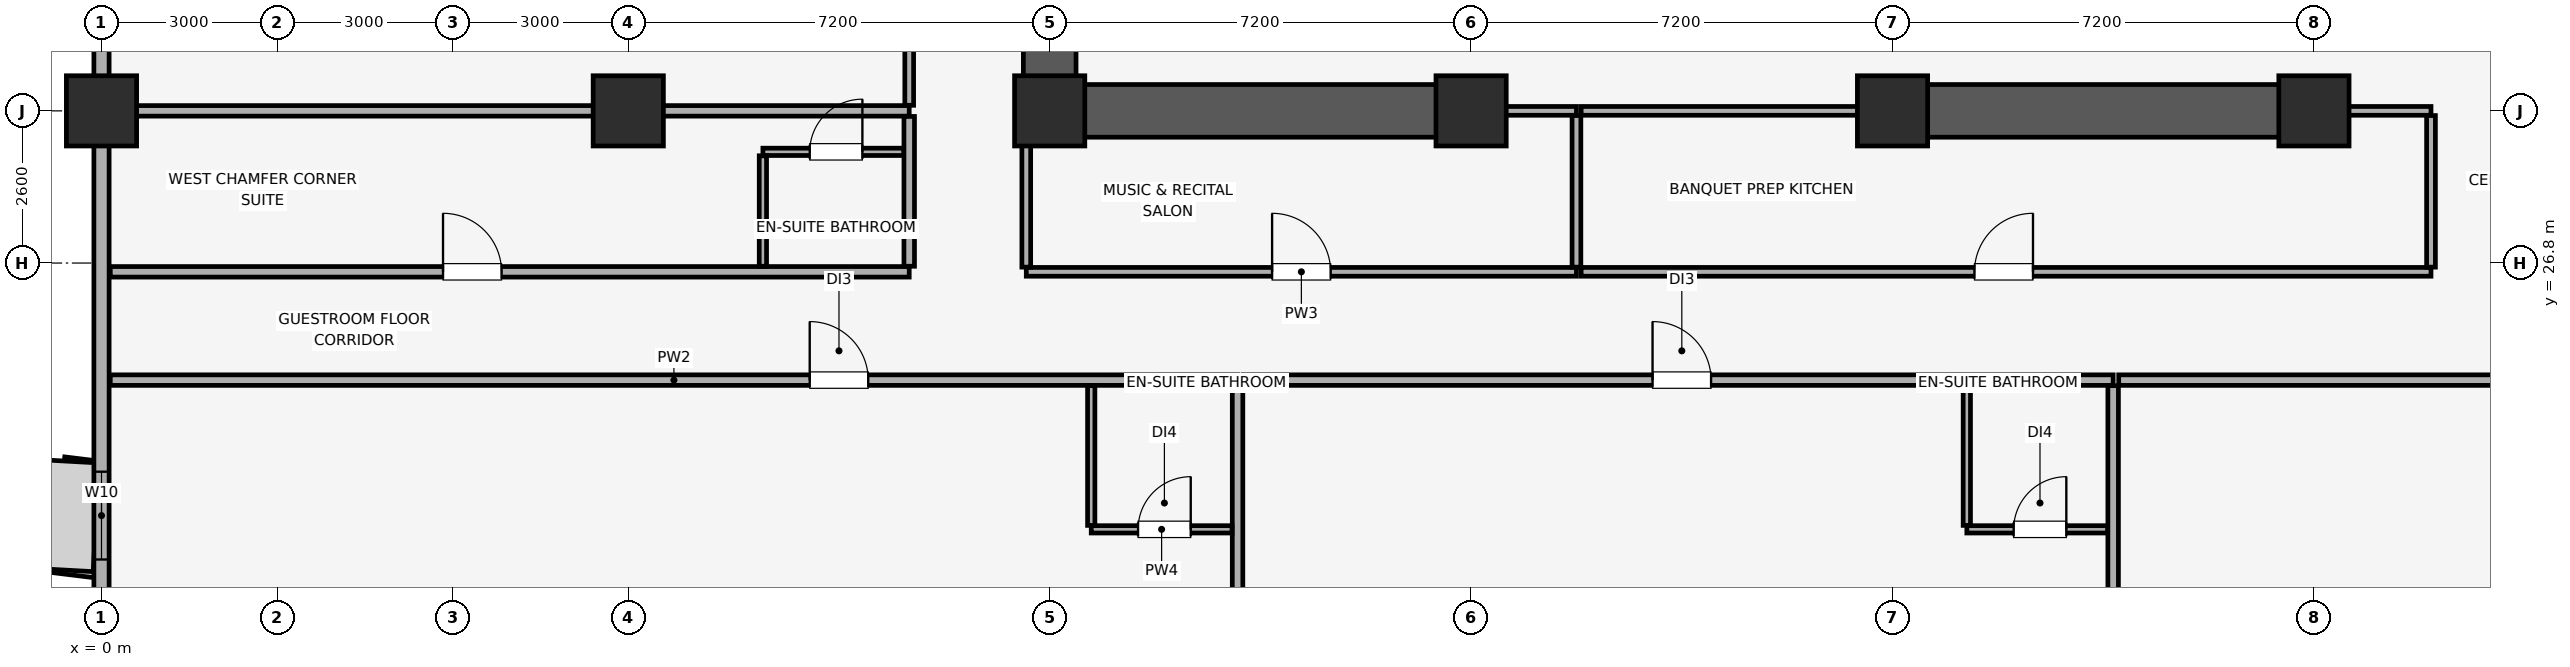
"""IFC4 building model, lengths in metres.
Left out: names, types, materials, properties, quantities, classifications, styles, units other than length and angle.
Written with IfcOpenShell. Run it as: python <this file> out.ifc"""

import sys

from ifc_helpers import new_model, si_unit, direction, frame, frame_2d, origin, origin_2d, place, context, subcontext, project, spatial, rectangle, extrude, element, fill, save


model = new_model("IFC4")
c1 = context("Model", 3, precision=1e-05, world=origin(), true_north=direction((0.0, 1.0)))
c2 = subcontext(c1, "Body", "Model", "MODEL_VIEW")
j1 = project(units=[si_unit("LENGTHUNIT", "METRE"), si_unit("PLANEANGLEUNIT", "RADIAN")], contexts=[c1])
p1 = place(None, origin())
s1 = spatial("IfcSite", under=j1, at=p1, CompositionType="ELEMENT")
p2 = place(p1, origin())
s2 = spatial("IfcBuilding", under=s1, at=p2, CompositionType="ELEMENT")
p3 = place(p2, frame((0.0, 0.0, 126.8)))
s3 = spatial("IfcBuildingStorey", under=s2, at=p3, CompositionType="ELEMENT", Elevation=126.8)
for number, where, z_axis, x_axis in (
    (1, (0.0, 29.4, 0.0), (0.0, 0.0, 1.0), (1.0, 0.0, 0.0)),
    (2, (9.0, 29.4, 0.0), (0.0, 0.0, 1.0), (1.0, 0.0, 0.0)),
    (3, (16.2, 29.4, 0.0), (0.0, 0.0, 1.0), (1.0, 0.0, 0.0)),
    (4, (23.4, 29.4, 0.0), (0.0, 0.0, 1.0), (1.0, 0.0, 0.0)),
    (5, (30.6, 29.4, 0.0), (0.0, 0.0, 1.0), (1.0, 0.0, 0.0)),
    (6, (37.8, 29.4, 0.0), (0.0, 0.0, 1.0), (1.0, 0.0, 0.0)),
):
    element("IfcColumn", number, at=place(p3, frame(where, z_axis=z_axis, x_axis=x_axis)), inside=s3, PredefinedType="COLUMN", context=c2, shape_type="SweptSolid", body=[
        extrude(rectangle(XDim=1.2, YDim=1.2, at=origin_2d()), origin(), (0.0, 0.0, 1.0), 3.51),
    ])
p4 = place(p3, frame((0.0, 44.8, 0.0), z_axis=(0.0, 0.0, 1.0), x_axis=(0.0, -1.0, 0.0)))
e7 = element("IfcWall", 7, at=p4, inside=s3, PredefinedType="SOLIDWALL", context=c2, shape_type="SweptSolid", body=[
    extrude(rectangle(XDim=40.6, YDim=0.26, at=frame_2d((20.3, 0.0))), origin(), (0.0, 0.0, 1.0), 2.56),
])
p5 = place(p4, frame((33.05, 0.0, 0.85)))
e8 = element("IfcOpeningElement", 8, at=p5, cuts=e7, PredefinedType="OPENING", context=c2, shape_type="SweptSolid", body=[
    extrude(rectangle(XDim=1.5, YDim=1.4, at=frame_2d((0.75, 0.7))), frame((0.0, 0.14, 0.0), z_axis=(0.0, -1.0, 0.0), x_axis=(1.0, 0.0, 0.0)), (0.0, 0.0, 1.0), 0.28),
])
p6 = place(p4, frame((26.335, 0.0, 0.85)))
e9 = element("IfcOpeningElement", 9, at=p6, cuts=e7, PredefinedType="OPENING", context=c2, shape_type="SweptSolid", body=[
    extrude(rectangle(XDim=1.5, YDim=1.4, at=frame_2d((0.75, 0.7))), frame((0.0, 0.14, 0.0), z_axis=(0.0, -1.0, 0.0), x_axis=(1.0, 0.0, 0.0)), (0.0, 0.0, 1.0), 0.28),
])
p7 = place(p4, frame((21.565, 0.0, 0.85)))
e10 = element("IfcOpeningElement", 10, at=p7, cuts=e7, PredefinedType="OPENING", context=c2, shape_type="SweptSolid", body=[
    extrude(rectangle(XDim=1.5, YDim=1.4, at=frame_2d((0.75, 0.7))), frame((0.0, 0.14, 0.0), z_axis=(0.0, -1.0, 0.0), x_axis=(1.0, 0.0, 0.0)), (0.0, 0.0, 1.0), 0.28),
])
p8 = place(p4, frame((11.935, 0.0, 0.85)))
e11 = element("IfcOpeningElement", 11, at=p8, cuts=e7, PredefinedType="OPENING", context=c2, shape_type="SweptSolid", body=[
    extrude(rectangle(XDim=1.5, YDim=1.4, at=frame_2d((0.75, 0.7))), frame((0.0, 0.14, 0.0), z_axis=(0.0, -1.0, 0.0), x_axis=(1.0, 0.0, 0.0)), (0.0, 0.0, 1.0), 0.28),
])
p9 = place(p4, frame((7.165, 0.0, 0.85)))
e12 = element("IfcOpeningElement", 12, at=p9, cuts=e7, PredefinedType="OPENING", context=c2, shape_type="SweptSolid", body=[
    extrude(rectangle(XDim=1.5, YDim=1.4, at=frame_2d((0.75, 0.7))), frame((0.0, 0.14, 0.0), z_axis=(0.0, -1.0, 0.0), x_axis=(1.0, 0.0, 0.0)), (0.0, 0.0, 1.0), 0.28),
])
p10 = place(p4, frame((1.735, 0.0, 0.85)))
e13 = element("IfcOpeningElement", 13, at=p10, cuts=e7, PredefinedType="OPENING", context=c2, shape_type="SweptSolid", body=[
    extrude(rectangle(XDim=1.5, YDim=1.4, at=frame_2d((0.75, 0.7))), frame((0.0, 0.14, 0.0), z_axis=(0.0, -1.0, 0.0), x_axis=(1.0, 0.0, 0.0)), (0.0, 0.0, 1.0), 0.28),
])
p11 = place(p3, frame((16.2, 29.4, 0.0), z_axis=(0.0, 0.0, 1.0), x_axis=(0.0, 1.0, 0.0)))
e14 = element("IfcWall", 14, at=p11, inside=s3, PredefinedType="SHEAR", context=c2, shape_type="SweptSolid", body=[
    extrude(rectangle(XDim=19.2, YDim=0.9, at=frame_2d((9.6, 0.0))), origin(), (0.0, 0.0, 1.0), 3.51),
])
p12 = place(p3, frame((16.655, 29.4, 0.0), z_axis=(0.0, 0.0, 1.0), x_axis=(1.0, 0.0, 0.0)))
e15 = element("IfcWall", 15, at=p12, inside=s3, PredefinedType="SHEAR", context=c2, shape_type="SweptSolid", body=[
    extrude(rectangle(XDim=6.945, YDim=0.9, at=frame_2d((3.473, 0.0))), origin(), (0.0, 0.0, 1.0), 3.51),
])
p13 = place(p3, frame((30.4, 29.4, 0.0), z_axis=(0.0, 0.0, 1.0), x_axis=(1.0, 0.0, 0.0)))
e16 = element("IfcWall", 16, at=p13, inside=s3, PredefinedType="SHEAR", context=c2, shape_type="SweptSolid", body=[
    extrude(rectangle(XDim=7.6, YDim=0.9, at=frame_2d((3.8, 0.0))), origin(), (0.0, 0.0, 1.0), 3.51),
])
p14 = place(p3, frame((0.15, 24.8, 0.0), z_axis=(0.0, 0.0, 1.0), x_axis=(1.0, 0.0, 0.0)))
e17 = element("IfcWall", 17, at=p14, inside=s3, PredefinedType="PARTITIONING", context=c2, shape_type="SweptSolid", body=[
    extrude(rectangle(XDim=19.26, YDim=0.18, at=frame_2d((9.63, 0.0))), origin(), (0.0, 0.0, 1.0), 3.51),
])
p15 = place(p14, frame((11.95, 0.0, 0.0)))
e18 = element("IfcOpeningElement", 18, at=p15, cuts=e17, PredefinedType="OPENING", context=c2, shape_type="SweptSolid", body=[
    extrude(rectangle(XDim=1.0, YDim=2.15, at=frame_2d((0.5, 1.075))), frame((0.0, 0.1, 0.0), z_axis=(0.0, -1.0, 0.0), x_axis=(1.0, 0.0, 0.0)), (0.0, 0.0, 1.0), 0.2),
])
p16 = place(p3, frame((19.41, 0.15, 0.0), z_axis=(0.0, 0.0, 1.0), x_axis=(0.0, 1.0, 0.0)))
e19 = element("IfcWall", 19, at=p16, inside=s3, PredefinedType="PARTITIONING", context=c2, shape_type="SweptSolid", body=[
    extrude(rectangle(XDim=24.555, YDim=0.18, at=frame_2d((12.278, 0.0))), origin(), (0.0, 0.0, 1.0), 3.51),
])
p17 = place(p3, frame((16.91, 22.25, 0.0), z_axis=(0.0, 0.0, 1.0), x_axis=(1.0, 0.0, 0.0)))
e20 = element("IfcWall", 20, at=p17, inside=s3, PredefinedType="PARTITIONING", context=c2, shape_type="SweptSolid", body=[
    extrude(rectangle(XDim=2.405, YDim=0.125, at=frame_2d((1.202, 0.0))), origin(), (0.0, 0.0, 1.0), 3.51),
])
p18 = place(p17, frame((0.8, 0.0, 0.0)))
e21 = element("IfcOpeningElement", 21, at=p18, cuts=e20, PredefinedType="OPENING", context=c2, shape_type="SweptSolid", body=[
    extrude(rectangle(XDim=0.9, YDim=2.1, at=frame_2d((0.45, 1.05))), frame((0.0, 0.073, 0.0), z_axis=(0.0, -1.0, 0.0), x_axis=(1.0, 0.0, 0.0)), (0.0, 0.0, 1.0), 0.145),
])
p19 = place(p3, frame((16.91, 22.317, 0.0), z_axis=(0.0, 0.0, 1.0), x_axis=(0.0, 1.0, 0.0)))
e22 = element("IfcWall", 22, at=p19, inside=s3, PredefinedType="PARTITIONING", context=c2, shape_type="SweptSolid", body=[
    extrude(rectangle(XDim=2.388, YDim=0.125, at=frame_2d((1.194, 0.0))), origin(), (0.0, 0.0, 1.0), 3.51),
])
p20 = place(p3, frame((19.505, 24.8, 0.0), z_axis=(0.0, 0.0, 1.0), x_axis=(1.0, 0.0, 0.0)))
e23 = element("IfcWall", 23, at=p20, inside=s3, PredefinedType="PARTITIONING", context=c2, shape_type="SweptSolid", body=[
    extrude(rectangle(XDim=14.865, YDim=0.18, at=frame_2d((7.432, 0.0))), origin(), (0.0, 0.0, 1.0), 3.51),
])
p21 = place(p20, frame((6.995, 0.0, 0.0)))
e24 = element("IfcOpeningElement", 24, at=p21, cuts=e23, PredefinedType="OPENING", context=c2, shape_type="SweptSolid", body=[
    extrude(rectangle(XDim=1.0, YDim=2.15, at=frame_2d((0.5, 1.075))), frame((0.0, 0.1, 0.0), z_axis=(0.0, -1.0, 0.0), x_axis=(1.0, 0.0, 0.0)), (0.0, 0.0, 1.0), 0.2),
])
p22 = place(p3, frame((34.369, 0.15, 0.0), z_axis=(0.0, 0.0, 1.0), x_axis=(0.0, 1.0, 0.0)))
e25 = element("IfcWall", 25, at=p22, inside=s3, PredefinedType="PARTITIONING", context=c2, shape_type="SweptSolid", body=[
    extrude(rectangle(XDim=24.555, YDim=0.18, at=frame_2d((12.278, 0.0))), origin(), (0.0, 0.0, 1.0), 2.91),
])
p23 = place(p3, frame((31.869, 22.25, 0.0), z_axis=(0.0, 0.0, 1.0), x_axis=(1.0, 0.0, 0.0)))
e26 = element("IfcWall", 26, at=p23, inside=s3, PredefinedType="PARTITIONING", context=c2, shape_type="SweptSolid", body=[
    extrude(rectangle(XDim=2.405, YDim=0.125, at=frame_2d((1.203, 0.0))), origin(), (0.0, 0.0, 1.0), 3.51),
])
p24 = place(p23, frame((0.8, 0.0, 0.0)))
e27 = element("IfcOpeningElement", 27, at=p24, cuts=e26, PredefinedType="OPENING", context=c2, shape_type="SweptSolid", body=[
    extrude(rectangle(XDim=0.9, YDim=2.1, at=frame_2d((0.45, 1.05))), frame((0.0, 0.073, 0.0), z_axis=(0.0, -1.0, 0.0), x_axis=(1.0, 0.0, 0.0)), (0.0, 0.0, 1.0), 0.145),
])
p25 = place(p3, frame((31.869, 22.317, 0.0), z_axis=(0.0, 0.0, 1.0), x_axis=(0.0, 1.0, 0.0)))
e28 = element("IfcWall", 28, at=p25, inside=s3, PredefinedType="PARTITIONING", context=c2, shape_type="SweptSolid", body=[
    extrude(rectangle(XDim=2.388, YDim=0.125, at=frame_2d((1.194, 0.0))), origin(), (0.0, 0.0, 1.0), 3.51),
])
p26 = place(p3, frame((34.465, 24.8, 0.0), z_axis=(0.0, 0.0, 1.0), x_axis=(1.0, 0.0, 0.0)))
e29 = element("IfcWall", 29, at=p26, inside=s3, PredefinedType="PARTITIONING", context=c2, shape_type="SweptSolid", body=[
    extrude(rectangle(XDim=15.065, YDim=0.18, at=frame_2d((7.533, 0.0))), origin(), (0.0, 0.0, 1.0), 3.51),
])
p27 = place(p26, frame((7.035, 0.0, 0.0)))
e30 = element("IfcOpeningElement", 30, at=p27, cuts=e29, PredefinedType="OPENING", context=c2, shape_type="SweptSolid", body=[
    extrude(rectangle(XDim=1.0, YDim=2.15, at=frame_2d((0.5, 1.075))), frame((0.0, 0.1, 0.0), z_axis=(0.0, -1.0, 0.0), x_axis=(1.0, 0.0, 0.0)), (0.0, 0.0, 1.0), 0.2),
])
p28 = place(p3, frame((15.8, 26.65, 0.0), z_axis=(0.0, 0.0, 1.0), x_axis=(1.0, 0.0, 0.0)))
e31 = element("IfcWall", 31, at=p28, inside=s3, PredefinedType="PARTITIONING", context=c2, shape_type="SweptSolid", body=[
    extrude(rectangle(XDim=9.4, YDim=0.15, at=frame_2d((4.7, 0.0))), origin(), (0.0, 0.0, 1.0), 3.51),
])
p29 = place(p28, frame((4.2, 0.0, 0.0)))
e32 = element("IfcOpeningElement", 32, at=p29, cuts=e31, PredefinedType="OPENING", context=c2, shape_type="SweptSolid", body=[
    extrude(rectangle(XDim=1.0, YDim=2.15, at=frame_2d((0.5, 1.075))), frame((0.0, 0.085, 0.0), z_axis=(0.0, -1.0, 0.0), x_axis=(1.0, 0.0, 0.0)), (0.0, 0.0, 1.0), 0.17),
])
p30 = place(p3, frame((23.61, 29.4, 0.0), z_axis=(0.0, 0.0, 1.0), x_axis=(1.0, 0.0, 0.0)))
e33 = element("IfcWall", 33, at=p30, inside=s3, PredefinedType="PARTITIONING", context=c2, shape_type="SweptSolid", body=[
    extrude(rectangle(XDim=1.59, YDim=0.15, at=frame_2d((0.795, 0.0))), origin(), (0.0, 0.0, 1.0), 2.41),
])
p31 = place(p3, frame((15.8, 26.73, 0.0), z_axis=(0.0, 0.0, 1.0), x_axis=(0.0, 1.0, 0.0)))
e34 = element("IfcWall", 34, at=p31, inside=s3, PredefinedType="PARTITIONING", context=c2, shape_type="SweptSolid", body=[
    extrude(rectangle(XDim=2.66, YDim=0.15, at=frame_2d((1.33, 0.0))), origin(), (0.0, 0.0, 1.0), 3.51),
])
p32 = place(p3, frame((25.2, 26.73, 0.0), z_axis=(0.0, 0.0, 1.0), x_axis=(0.0, 1.0, 0.0)))
e35 = element("IfcWall", 35, at=p32, inside=s3, PredefinedType="PARTITIONING", context=c2, shape_type="SweptSolid", body=[
    extrude(rectangle(XDim=2.59, YDim=0.15, at=frame_2d((1.295, 0.0))), origin(), (0.0, 0.0, 1.0), 3.51),
])
p33 = place(p3, frame((25.28, 26.65, 0.0), z_axis=(0.0, 0.0, 1.0), x_axis=(1.0, 0.0, 0.0)))
e36 = element("IfcWall", 36, at=p33, inside=s3, PredefinedType="PARTITIONING", context=c2, shape_type="SweptSolid", body=[
    extrude(rectangle(XDim=14.52, YDim=0.15, at=frame_2d((7.26, 0.0))), origin(), (0.0, 0.0, 1.0), 3.51),
])
p34 = place(p33, frame((6.72, 0.0, 0.0)))
e37 = element("IfcOpeningElement", 37, at=p34, cuts=e36, PredefinedType="OPENING", context=c2, shape_type="SweptSolid", body=[
    extrude(rectangle(XDim=1.0, YDim=2.15, at=frame_2d((0.5, 1.075))), frame((0.0, 0.085, 0.0), z_axis=(0.0, -1.0, 0.0), x_axis=(1.0, 0.0, 0.0)), (0.0, 0.0, 1.0), 0.17),
])
p35 = place(p3, frame((25.28, 29.4, 0.0), z_axis=(0.0, 0.0, 1.0), x_axis=(1.0, 0.0, 0.0)))
e38 = element("IfcWall", 38, at=p35, inside=s3, PredefinedType="PARTITIONING", context=c2, shape_type="SweptSolid", body=[
    extrude(rectangle(XDim=5.11, YDim=0.15, at=frame_2d((2.555, 0.0))), origin(), (0.0, 0.0, 1.0), 2.41),
])
p36 = place(p3, frame((38.01, 29.4, 0.0), z_axis=(0.0, 0.0, 1.0), x_axis=(1.0, 0.0, 0.0)))
e39 = element("IfcWall", 39, at=p36, inside=s3, PredefinedType="PARTITIONING", context=c2, shape_type="SweptSolid", body=[
    extrude(rectangle(XDim=1.79, YDim=0.15, at=frame_2d((0.895, 0.0))), origin(), (0.0, 0.0, 1.0), 2.41),
])
p37 = place(p3, frame((39.8, 26.73, 0.0), z_axis=(0.0, 0.0, 1.0), x_axis=(0.0, 1.0, 0.0)))
e40 = element("IfcWall", 40, at=p37, inside=s3, PredefinedType="PARTITIONING", context=c2, shape_type="SweptSolid", body=[
    extrude(rectangle(XDim=2.59, YDim=0.15, at=frame_2d((1.295, 0.0))), origin(), (0.0, 0.0, 1.0), 3.51),
])
p38 = place(p3, frame((0.15, 26.65, 0.0), z_axis=(0.0, 0.0, 1.0), x_axis=(1.0, 0.0, 0.0)))
e41 = element("IfcWall", 41, at=p38, inside=s3, PredefinedType="PARTITIONING", context=c2, shape_type="SweptSolid", body=[
    extrude(rectangle(XDim=13.65, YDim=0.18, at=frame_2d((6.825, 0.0))), origin(), (0.0, 0.0, 1.0), 3.51),
])
p39 = place(p38, frame((5.685, 0.0, 0.0)))
e42 = element("IfcOpeningElement", 42, at=p39, cuts=e41, PredefinedType="OPENING", context=c2, shape_type="SweptSolid", body=[
    extrude(rectangle(XDim=1.0, YDim=2.15, at=frame_2d((0.5, 1.075))), frame((0.0, 0.1, 0.0), z_axis=(0.0, -1.0, 0.0), x_axis=(1.0, 0.0, 0.0)), (0.0, 0.0, 1.0), 0.2),
])
p40 = place(p3, frame((0.15, 29.4, 0.0), z_axis=(0.0, 0.0, 1.0), x_axis=(1.0, 0.0, 0.0)))
e43 = element("IfcWall", 43, at=p40, inside=s3, PredefinedType="PARTITIONING", context=c2, shape_type="SweptSolid", body=[
    extrude(rectangle(XDim=13.65, YDim=0.18, at=frame_2d((6.825, 0.0))), origin(), (0.0, 0.0, 1.0), 2.669),
])
p41 = place(p3, frame((13.8, 26.745, 0.0), z_axis=(0.0, 0.0, 1.0), x_axis=(0.0, 1.0, 0.0)))
e44 = element("IfcWall", 44, at=p41, inside=s3, PredefinedType="PARTITIONING", context=c2, shape_type="SweptSolid", body=[
    extrude(rectangle(XDim=2.56, YDim=0.18, at=frame_2d((1.28, 0.0))), origin(), (0.0, 0.0, 1.0), 3.51),
])
p42 = place(p3, frame((11.3, 28.7, 0.0), z_axis=(0.0, 0.0, 1.0), x_axis=(1.0, 0.0, 0.0)))
e45 = element("IfcWall", 45, at=p42, inside=s3, PredefinedType="PARTITIONING", context=c2, shape_type="SweptSolid", body=[
    extrude(rectangle(XDim=2.405, YDim=0.125, at=frame_2d((1.203, 0.0))), origin(), (0.0, 0.0, 1.0), 3.51),
])
p43 = place(p42, frame((0.8, 0.0, 0.0)))
e46 = element("IfcOpeningElement", 46, at=p43, cuts=e45, PredefinedType="OPENING", context=c2, shape_type="SweptSolid", body=[
    extrude(rectangle(XDim=0.9, YDim=2.1, at=frame_2d((0.45, 1.05))), frame((0.0, 0.073, 0.0), z_axis=(0.0, -1.0, 0.0), x_axis=(1.0, 0.0, 0.0)), (0.0, 0.0, 1.0), 0.145),
])
p44 = place(p3, frame((11.3, 26.745, 0.0), z_axis=(0.0, 0.0, 1.0), x_axis=(0.0, 1.0, 0.0)))
e47 = element("IfcWall", 47, at=p44, inside=s3, PredefinedType="PARTITIONING", context=c2, shape_type="SweptSolid", body=[
    extrude(rectangle(XDim=1.887, YDim=0.125, at=frame_2d((0.944, 0.0))), origin(), (0.0, 0.0, 1.0), 3.51),
])
p45 = place(p3, frame((13.8, 29.495, 0.0), z_axis=(0.0, 0.0, 1.0), x_axis=(0.0, 1.0, 0.0)))
e48 = element("IfcWall", 48, at=p45, inside=s3, PredefinedType="PARTITIONING", context=c2, shape_type="SweptSolid", body=[
    extrude(rectangle(XDim=19.355, YDim=0.15, at=frame_2d((9.677, 0.0))), origin(), (0.0, 0.0, 1.0), 3.51),
])
p46 = place(p45, frame((5.255, 0.0, 0.0)))
e49 = element("IfcOpeningElement", 49, at=p46, cuts=e48, PredefinedType="OPENING", context=c2, shape_type="SweptSolid", body=[
    extrude(rectangle(XDim=1.5, YDim=2.25, at=frame_2d((0.75, 1.125))), frame((0.0, 0.085, 0.0), z_axis=(0.0, -1.0, 0.0), x_axis=(1.0, 0.0, 0.0)), (0.0, 0.0, 1.0), 0.17),
])
p47 = place(p7, origin())
e50 = element("IfcWindow", 50, at=p47, inside=s3, PartitioningType="SINGLE_PANEL", PredefinedType="WINDOW", context=c2, shape_type="SweptSolid", body=[
    extrude(rectangle(XDim=1.5, YDim=1.4, at=frame_2d((0.75, 0.7))), frame((0.0, 0.03, 0.0), z_axis=(0.0, -1.0, 0.0), x_axis=(1.0, 0.0, 0.0)), (0.0, 0.0, 1.0), 0.06),
])
fill(e10, e50)
p48 = place(p15, origin())
e51 = element("IfcDoor", 51, at=p48, inside=s3, OperationType="SINGLE_SWING_LEFT", PredefinedType="DOOR", context=c2, shape_type="SweptSolid", body=[
    extrude(rectangle(XDim=1.0, YDim=2.15, at=frame_2d((0.5, 1.075))), frame((0.0, 0.025, 0.0), z_axis=(0.0, -1.0, 0.0), x_axis=(1.0, 0.0, 0.0)), (0.0, 0.0, 1.0), 0.05),
])
fill(e18, e51)
p49 = place(p18, origin())
e52 = element("IfcDoor", 52, at=p49, inside=s3, OperationType="SINGLE_SWING_RIGHT", PredefinedType="DOOR", context=c2, shape_type="SweptSolid", body=[
    extrude(rectangle(XDim=0.9, YDim=2.1, at=frame_2d((0.45, 1.05))), frame((0.0, 0.025, 0.0), z_axis=(0.0, -1.0, 0.0), x_axis=(1.0, 0.0, 0.0)), (0.0, 0.0, 1.0), 0.05),
])
fill(e21, e52)
p50 = place(p21, origin())
e53 = element("IfcDoor", 53, at=p50, inside=s3, OperationType="SINGLE_SWING_LEFT", PredefinedType="DOOR", context=c2, shape_type="SweptSolid", body=[
    extrude(rectangle(XDim=1.0, YDim=2.15, at=frame_2d((0.5, 1.075))), frame((0.0, 0.025, 0.0), z_axis=(0.0, -1.0, 0.0), x_axis=(1.0, 0.0, 0.0)), (0.0, 0.0, 1.0), 0.05),
])
fill(e24, e53)
p51 = place(p24, origin())
e54 = element("IfcDoor", 54, at=p51, inside=s3, OperationType="SINGLE_SWING_RIGHT", PredefinedType="DOOR", context=c2, shape_type="SweptSolid", body=[
    extrude(rectangle(XDim=0.9, YDim=2.1, at=frame_2d((0.45, 1.05))), frame((0.0, 0.025, 0.0), z_axis=(0.0, -1.0, 0.0), x_axis=(1.0, 0.0, 0.0)), (0.0, 0.0, 1.0), 0.05),
])
fill(e27, e54)
p52 = place(p29, origin())
e55 = element("IfcDoor", 55, at=p52, inside=s3, OperationType="SINGLE_SWING_LEFT", PredefinedType="DOOR", context=c2, shape_type="SweptSolid", body=[
    extrude(rectangle(XDim=1.0, YDim=2.15, at=frame_2d((0.5, 1.075))), frame((0.0, 0.025, 0.0), z_axis=(0.0, -1.0, 0.0), x_axis=(1.0, 0.0, 0.0)), (0.0, 0.0, 1.0), 0.05),
])
fill(e32, e55)
p53 = place(p34, origin())
e56 = element("IfcDoor", 56, at=p53, inside=s3, OperationType="SINGLE_SWING_RIGHT", PredefinedType="DOOR", context=c2, shape_type="SweptSolid", body=[
    extrude(rectangle(XDim=1.0, YDim=2.15, at=frame_2d((0.5, 1.075))), frame((0.0, 0.025, 0.0), z_axis=(0.0, -1.0, 0.0), x_axis=(1.0, 0.0, 0.0)), (0.0, 0.0, 1.0), 0.05),
])
fill(e37, e56)
p54 = place(p39, origin())
e57 = element("IfcDoor", 57, at=p54, inside=s3, OperationType="SINGLE_SWING_LEFT", PredefinedType="DOOR", context=c2, shape_type="SweptSolid", body=[
    extrude(rectangle(XDim=1.0, YDim=2.15, at=frame_2d((0.5, 1.075))), frame((0.0, 0.025, 0.0), z_axis=(0.0, -1.0, 0.0), x_axis=(1.0, 0.0, 0.0)), (0.0, 0.0, 1.0), 0.05),
])
fill(e42, e57)
p55 = place(p43, origin())
e58 = element("IfcDoor", 58, at=p55, inside=s3, OperationType="SINGLE_SWING_RIGHT", PredefinedType="DOOR", context=c2, shape_type="SweptSolid", body=[
    extrude(rectangle(XDim=0.9, YDim=2.1, at=frame_2d((0.45, 1.05))), frame((0.0, 0.025, 0.0), z_axis=(0.0, -1.0, 0.0), x_axis=(1.0, 0.0, 0.0)), (0.0, 0.0, 1.0), 0.05),
])
fill(e46, e58)
save(model, sys.argv[1])
